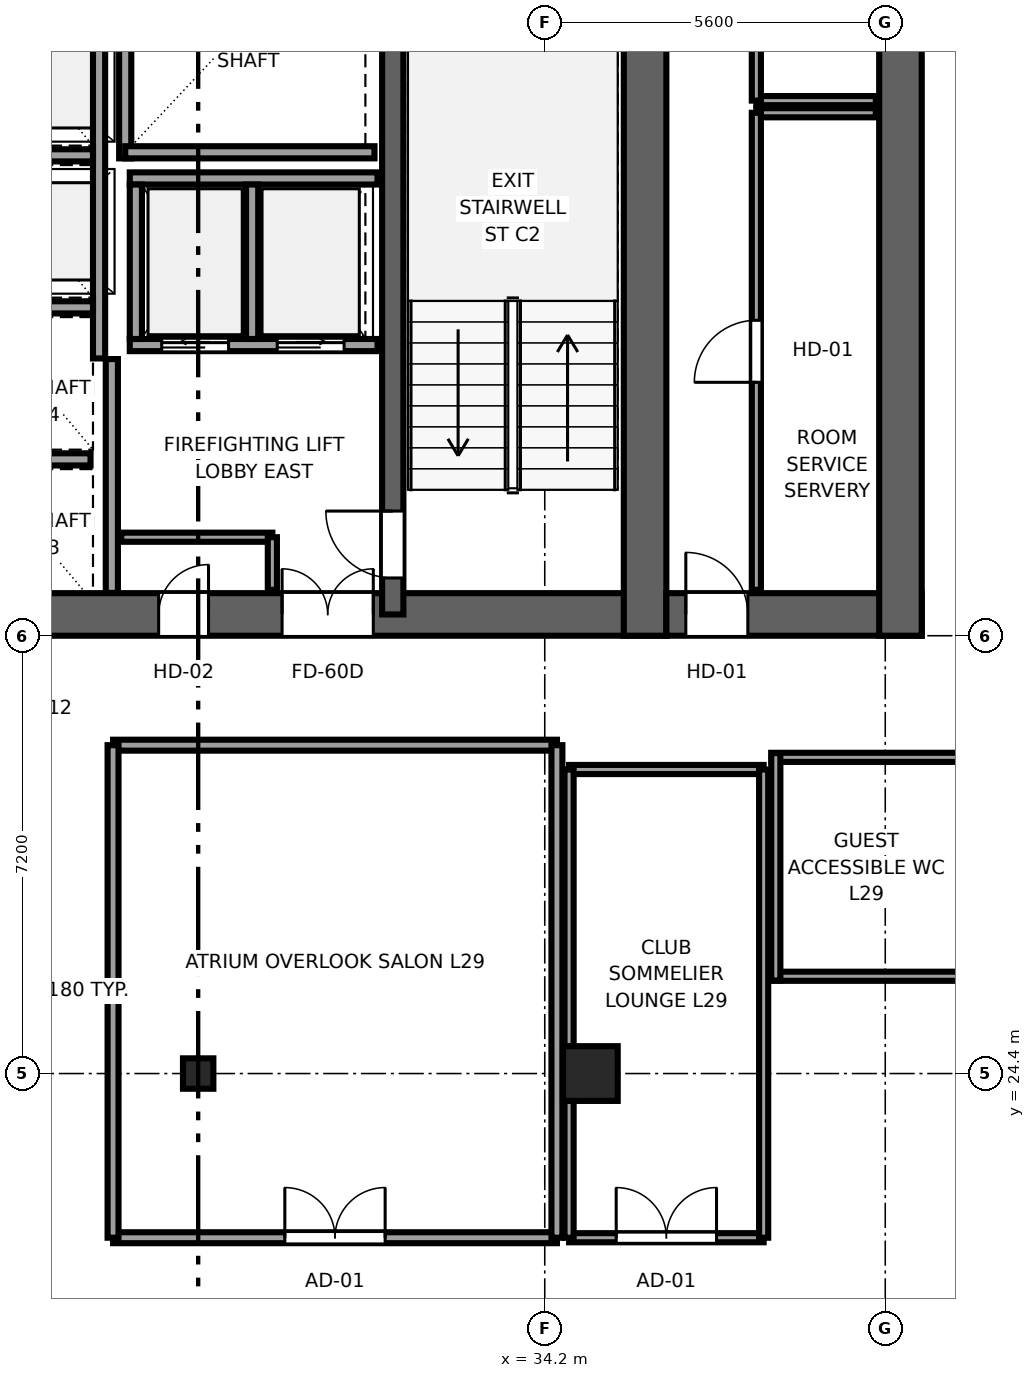
"""IFC4 building model, lengths in metres.
Left out: names, types, materials, properties, quantities, classifications, styles, units other than length and angle.
Written with IfcOpenShell. Run it as: python <this file> out.ifc"""

import sys

from ifc_helpers import new_model, si_unit, direction, frame, frame_2d, origin, origin_2d, place, context, subcontext, project, spatial, rectangle, i_section, extrude, source, transform, mapped, element, fill, save


model = new_model("IFC4")
c1 = context("Model", 3, precision=1e-05, world=origin(), true_north=direction((0.0, 1.0)))
c2 = subcontext(c1, "Body", "Model", "MODEL_VIEW")
j1 = project(units=[si_unit("LENGTHUNIT", "METRE"), si_unit("PLANEANGLEUNIT", "RADIAN")], contexts=[c1])
p1 = place(None, origin())
s1 = spatial("IfcSite", under=j1, at=p1, CompositionType="ELEMENT")
p2 = place(p1, origin())
s2 = spatial("IfcBuilding", under=s1, at=p2, CompositionType="ELEMENT")
p3 = place(p2, frame((0.0, 0.0, 115.1)))
s3 = spatial("IfcBuildingStorey", under=s2, at=p3, CompositionType="ELEMENT", Elevation=115.1)
p4 = place(p3, frame((9.8, 31.95, 0.0), z_axis=(0.0, 0.0, 1.0), x_axis=(1.0, 0.0, 0.0)))
e1 = element("IfcWall", 1, at=p4, inside=s3, PredefinedType="SHEAR", context=c2, shape_type="SweptSolid", body=[
    extrude(rectangle(XDim=26.4, YDim=0.7, at=frame_2d((13.2, 0.0))), origin(), (0.0, 0.0, 1.0), 3.55),
])
p5 = place(p4, frame((6.32, 0.0, 0.0), z_axis=(0.0, 0.0, 1.0), x_axis=(-1.0, 0.0, 0.0)))
e2 = element("IfcOpeningElement", 2, at=p5, cuts=e1, PredefinedType="OPENING", context=c2, shape_type="SweptSolid", body=[
    extrude(rectangle(XDim=1.5, YDim=2.04, at=frame_2d((0.75, 1.02))), frame((0.0, 0.36, 0.0), z_axis=(0.0, -1.0, 0.0), x_axis=(1.0, 0.0, 0.0)), (0.0, 0.0, 1.0), 0.72),
])
p6 = place(p4, frame((13.95, 0.0, 0.0), z_axis=(0.0, 0.0, 1.0), x_axis=(-1.0, 0.0, 0.0)))
e3 = element("IfcOpeningElement", 3, at=p6, cuts=e1, PredefinedType="OPENING", context=c2, shape_type="SweptSolid", body=[
    extrude(rectangle(XDim=1.5, YDim=2.04, at=frame_2d((0.75, 1.02))), frame((0.0, 0.36, 0.0), z_axis=(0.0, -1.0, 0.0), x_axis=(1.0, 0.0, 0.0)), (0.0, 0.0, 1.0), 0.72),
])
p7 = place(p4, frame((21.58, 0.0, 0.0), z_axis=(0.0, 0.0, 1.0), x_axis=(-1.0, 0.0, 0.0)))
e4 = element("IfcOpeningElement", 4, at=p7, cuts=e1, PredefinedType="OPENING", context=c2, shape_type="SweptSolid", body=[
    extrude(rectangle(XDim=1.5, YDim=2.04, at=frame_2d((0.75, 1.02))), frame((0.0, 0.36, 0.0), z_axis=(0.0, -1.0, 0.0), x_axis=(1.0, 0.0, 0.0)), (0.0, 0.0, 1.0), 0.72),
])
p8 = place(p4, frame((8.37, 0.0, 0.0), z_axis=(0.0, 0.0, 1.0), x_axis=(-1.0, 0.0, 0.0)))
e5 = element("IfcOpeningElement", 5, at=p8, cuts=e1, PredefinedType="OPENING", context=c2, shape_type="SweptSolid", body=[
    extrude(rectangle(XDim=0.82, YDim=2.01, at=frame_2d((0.41, 1.005))), frame((0.0, 0.36, 0.0), z_axis=(0.0, -1.0, 0.0), x_axis=(1.0, 0.0, 0.0)), (0.0, 0.0, 1.0), 0.72),
])
p9 = place(p4, frame((18.87, 0.0, 0.0), z_axis=(0.0, 0.0, 1.0), x_axis=(-1.0, 0.0, 0.0)))
e6 = element("IfcOpeningElement", 6, at=p9, cuts=e1, PredefinedType="OPENING", context=c2, shape_type="SweptSolid", body=[
    extrude(rectangle(XDim=0.82, YDim=2.01, at=frame_2d((0.41, 1.005))), frame((0.0, 0.36, 0.0), z_axis=(0.0, -1.0, 0.0), x_axis=(1.0, 0.0, 0.0)), (0.0, 0.0, 1.0), 0.72),
])
p10 = place(p3, frame((35.85, 31.6, 0.0), z_axis=(0.0, 0.0, 1.0), x_axis=(0.0, 1.0, 0.0)))
e7 = element("IfcWall", 7, at=p10, inside=s3, PredefinedType="SHEAR", context=c2, shape_type="SweptSolid", body=[
    extrude(rectangle(XDim=13.6, YDim=0.7, at=frame_2d((6.8, 0.0))), origin(), (0.0, 0.0, 1.0), 3.55),
])
p11 = place(p3, frame((31.7, 31.95, 0.0), z_axis=(0.0, 0.0, 1.0), x_axis=(0.0, 1.0, 0.0)))
e8 = element("IfcWall", 8, at=p11, inside=s3, PredefinedType="SHEAR", context=c2, shape_type="SweptSolid", body=[
    extrude(rectangle(XDim=12.9, YDim=0.35, at=frame_2d((6.45, 0.0))), origin(), (0.0, 0.0, 1.0), 3.55),
])
p12 = place(p11, frame((1.7, 0.0, 0.0), z_axis=(0.0, 0.0, 1.0), x_axis=(-1.0, 0.0, 0.0)))
e9 = element("IfcOpeningElement", 9, at=p12, cuts=e8, PredefinedType="OPENING", context=c2, shape_type="SweptSolid", body=[
    extrude(rectangle(XDim=1.1, YDim=2.12, at=frame_2d((0.55, 1.06))), frame((0.0, 0.185, 0.0), z_axis=(0.0, -1.0, 0.0), x_axis=(1.0, 0.0, 0.0)), (0.0, 0.0, 1.0), 0.37),
])
p13 = place(p3, frame((36.2, 31.95, 0.0), z_axis=(0.0, 0.0, 1.0), x_axis=(1.0, 0.0, 0.0)))
e10 = element("IfcWall", 10, at=p13, inside=s3, PredefinedType="SHEAR", context=c2, shape_type="SweptSolid", body=[
    extrude(rectangle(XDim=4.2, YDim=0.7, at=frame_2d((2.1, 0.0))), origin(), (0.0, 0.0, 1.0), 3.55),
])
p14 = place(p13, frame((1.34, 0.0, 0.0), z_axis=(0.0, 0.0, 1.0), x_axis=(-1.0, 0.0, 0.0)))
e11 = element("IfcOpeningElement", 11, at=p14, cuts=e10, PredefinedType="OPENING", context=c2, shape_type="SweptSolid", body=[
    extrude(rectangle(XDim=1.02, YDim=2.03, at=frame_2d((0.51, 1.015))), frame((0.0, 0.36, 0.0), z_axis=(0.0, -1.0, 0.0), x_axis=(1.0, 0.0, 0.0)), (0.0, 0.0, 1.0), 0.72),
])
p15 = place(p3, frame((40.05, 31.6, 0.0), z_axis=(0.0, 0.0, 1.0), x_axis=(0.0, 1.0, 0.0)))
e12 = element("IfcWall", 12, at=p15, inside=s3, PredefinedType="SHEAR", context=c2, shape_type="SweptSolid", body=[
    extrude(rectangle(XDim=13.6, YDim=0.7, at=frame_2d((6.8, 0.0))), origin(), (0.0, 0.0, 1.0), 3.55),
])
m1 = source(origin(), c2, "Body", "SweptSolid", [
    extrude(rectangle(XDim=0.9, YDim=0.9, at=origin_2d()), origin(), (0.0, 0.0, 1.0), 3.55),
])
p16 = place(p3, frame((34.95, 24.4, 0.0), z_axis=(0.0, 0.0, 1.0), x_axis=(1.0, 0.0, 0.0)))
e13 = element("IfcColumn", 13, at=p16, inside=s3, PredefinedType="COLUMN", context=c2, shape_type="MappedRepresentation", body=[
    mapped(m1, transform((0.0, 0.0, 0.0), x_axis=(1.0, 0.0, 0.0), y_axis=(0.0, 1.0, 0.0), z_axis=(0.0, 0.0, 1.0), scale=1.0)),
])
m2 = source(origin(), c2, "Body", "SweptSolid", [
    extrude(i_section(OverallWidth=0.5, OverallDepth=0.5, WebThickness=0.022, FlangeThickness=0.034, at=origin_2d()), origin(), (0.0, 0.0, 1.0), 3.55),
])
p17 = place(p3, frame((28.5, 24.4, 0.0), z_axis=(0.0, 0.0, 1.0), x_axis=(1.0, 0.0, 0.0)))
e14 = element("IfcColumn", 14, at=p17, inside=s3, PredefinedType="COLUMN", context=c2, shape_type="MappedRepresentation", body=[
    mapped(m2, transform((0.0, 0.0, 0.0), x_axis=(1.0, 0.0, 0.0), y_axis=(0.0, 1.0, 0.0), z_axis=(0.0, 0.0, 1.0), scale=1.0)),
])
p18 = place(p3, frame((27.3, 39.45, 0.0), z_axis=(0.0, 0.0, 1.0), x_axis=(0.0, 1.0, 0.0)))
e15 = element("IfcWall", 15, at=p18, inside=s3, PredefinedType="SOLIDWALL", context=c2, shape_type="SweptSolid", body=[
    extrude(rectangle(XDim=4.4, YDim=0.2, at=frame_2d((2.2, 0.0))), origin(), (0.0, 0.0, 1.0), 3.37),
])
p19 = place(p3, frame((27.3, 39.55, 0.0), z_axis=(0.0, 0.0, 1.0), x_axis=(1.0, 0.0, 0.0)))
e16 = element("IfcWall", 16, at=p19, inside=s3, PredefinedType="SOLIDWALL", context=c2, shape_type="SweptSolid", body=[
    extrude(rectangle(XDim=4.1, YDim=0.2, at=frame_2d((2.05, 0.0))), origin(), (0.0, 0.0, 1.0), 3.37),
])
p20 = place(p3, frame((27.08, 32.304, 0.0), z_axis=(0.0, 0.0, 1.0), x_axis=(0.0, 1.0, 0.0)))
e17 = element("IfcWall", 17, at=p20, inside=s3, PredefinedType="SOLIDWALL", context=c2, shape_type="SweptSolid", body=[
    extrude(rectangle(XDim=3.846, YDim=0.2, at=frame_2d((1.923, 0.0))), origin(), (0.0, 0.0, 1.0), 3.37),
])
p21 = place(p3, frame((27.375, 36.38, 0.0), z_axis=(0.0, 0.0, 1.0), x_axis=(1.0, 0.0, 0.0)))
e18 = element("IfcWall", 18, at=p21, inside=s3, PredefinedType="SOLIDWALL", context=c2, shape_type="SweptSolid", body=[
    extrude(rectangle(XDim=4.075, YDim=0.2, at=frame_2d((2.038, 0.0))), origin(), (0.0, 0.0, 1.0), 3.37),
])
p22 = place(p21, frame((0.525, 0.0, 0.0)))
e19 = element("IfcOpeningElement", 19, at=p22, cuts=e18, PredefinedType="OPENING", context=c2, shape_type="SweptSolid", body=[
    extrude(rectangle(XDim=1.1, YDim=2.12, at=frame_2d((0.55, 1.06))), frame((0.0, 0.11, 0.0), z_axis=(0.0, -1.0, 0.0), x_axis=(1.0, 0.0, 0.0)), (0.0, 0.0, 1.0), 0.22),
])
p23 = place(p21, frame((2.425, 0.0, 0.0)))
e20 = element("IfcOpeningElement", 20, at=p23, cuts=e18, PredefinedType="OPENING", context=c2, shape_type="SweptSolid", body=[
    extrude(rectangle(XDim=1.1, YDim=2.12, at=frame_2d((0.55, 1.06))), frame((0.0, 0.11, 0.0), z_axis=(0.0, -1.0, 0.0), x_axis=(1.0, 0.0, 0.0)), (0.0, 0.0, 1.0), 0.22),
])
p24 = place(p3, frame((27.375, 39.12, 0.0), z_axis=(0.0, 0.0, 1.0), x_axis=(1.0, 0.0, 0.0)))
e21 = element("IfcWall", 21, at=p24, inside=s3, PredefinedType="SOLIDWALL", context=c2, shape_type="SweptSolid", body=[
    extrude(rectangle(XDim=4.075, YDim=0.2, at=frame_2d((2.038, 0.0))), origin(), (0.0, 0.0, 1.0), 3.37),
])
for number, where, z_axis, x_axis in (
    (22, (27.475, 36.48, 0.0), (0.0, 0.0, 1.0), (0.0, 1.0, 0.0)),
    (23, (29.387, 36.48, 0.0), (0.0, 0.0, 1.0), (0.0, 1.0, 0.0)),
):
    element("IfcWall", number, at=place(p3, frame(where, z_axis=z_axis, x_axis=x_axis)), inside=s3, PredefinedType="SOLIDWALL", context=c2, shape_type="SweptSolid", body=[
        extrude(rectangle(XDim=2.54, YDim=0.2, at=frame_2d((1.27, 0.0))), origin(), (0.0, 0.0, 1.0), 3.37),
    ])
p25 = place(p3, frame((26.87, 36.16, 0.0), z_axis=(0.0, 0.0, 1.0), x_axis=(0.0, 1.0, 0.0)))
e24 = element("IfcWall", 24, at=p25, inside=s3, PredefinedType="SOLIDWALL", context=c2, shape_type="SweptSolid", body=[
    extrude(rectangle(XDim=8.336, YDim=0.2, at=frame_2d((4.168, 0.0))), origin(), (0.0, 0.0, 1.0), 3.37),
])
p26 = place(p3, frame((24.93, 34.5, 0.0), z_axis=(0.0, 0.0, 1.0), x_axis=(1.0, 0.0, 0.0)))
e25 = element("IfcWall", 25, at=p26, inside=s3, PredefinedType="SOLIDWALL", context=c2, shape_type="SweptSolid", body=[
    extrude(rectangle(XDim=1.8, YDim=0.2, at=frame_2d((0.9, 0.0))), origin(), (0.0, 0.0, 1.0), 3.37),
])
for number, where, z_axis, x_axis in (
    (26, (24.93, 37.0, 0.0), (0.0, 0.0, 1.0), (1.0, 0.0, 0.0)),
    (27, (24.93, 39.5, 0.0), (0.0, 0.0, 1.0), (1.0, 0.0, 0.0)),
):
    element("IfcWall", number, at=place(p3, frame(where, z_axis=z_axis, x_axis=x_axis)), inside=s3, PredefinedType="SOLIDWALL", context=c2, shape_type="SweptSolid", body=[
        extrude(rectangle(XDim=1.84, YDim=0.2, at=frame_2d((0.92, 0.0))), origin(), (0.0, 0.0, 1.0), 3.37),
    ])
p27 = place(p3, frame((27.235, 33.22, 0.0), z_axis=(0.0, 0.0, 1.0), x_axis=(1.0, 0.0, 0.0)))
e28 = element("IfcWall", 28, at=p27, inside=s3, PredefinedType="PARTITIONING", context=c2, shape_type="SweptSolid", body=[
    extrude(rectangle(XDim=2.485, YDim=0.15, at=frame_2d((1.242, 0.0))), origin(), (0.0, 0.0, 1.0), 3.37),
])
p28 = place(p3, frame((29.72, 32.355, 0.0), z_axis=(0.0, 0.0, 1.0), x_axis=(0.0, 1.0, 0.0)))
e29 = element("IfcWall", 29, at=p28, inside=s3, PredefinedType="PARTITIONING", context=c2, shape_type="SweptSolid", body=[
    extrude(rectangle(XDim=0.865, YDim=0.15, at=frame_2d((0.433, 0.0))), origin(), (0.0, 0.0, 1.0), 3.37),
])
p29 = place(p3, frame((37.68, 40.2, 0.0), z_axis=(0.0, 0.0, 1.0), x_axis=(1.0, 0.0, 0.0)))
e30 = element("IfcWall", 30, at=p29, inside=s3, PredefinedType="PARTITIONING", context=c2, shape_type="SweptSolid", body=[
    extrude(rectangle(XDim=1.965, YDim=0.15, at=frame_2d((0.982, 0.0))), origin(), (0.0, 0.0, 1.0), 3.37),
])
p30 = place(p3, frame((37.68, 32.355, 0.0), z_axis=(0.0, 0.0, 1.0), x_axis=(0.0, 1.0, 0.0)))
e31 = element("IfcWall", 31, at=p30, inside=s3, PredefinedType="PARTITIONING", context=c2, shape_type="SweptSolid", body=[
    extrude(rectangle(XDim=7.845, YDim=0.15, at=frame_2d((3.922, 0.0))), origin(), (0.0, 0.0, 1.0), 3.37),
])
p31 = place(p30, frame((3.413, 0.0, 0.0)))
e32 = element("IfcOpeningElement", 32, at=p31, cuts=e31, PredefinedType="OPENING", context=c2, shape_type="SweptSolid", body=[
    extrude(rectangle(XDim=1.02, YDim=2.03, at=frame_2d((0.51, 1.015))), frame((0.0, 0.085, 0.0), z_axis=(0.0, -1.0, 0.0), x_axis=(1.0, 0.0, 0.0)), (0.0, 0.0, 1.0), 0.17),
])
p32 = place(p3, frame((37.68, 40.4, 0.0), z_axis=(0.0, 0.0, 1.0), x_axis=(1.0, 0.0, 0.0)))
e33 = element("IfcWall", 33, at=p32, inside=s3, PredefinedType="PARTITIONING", context=c2, shape_type="SweptSolid", body=[
    extrude(rectangle(XDim=1.965, YDim=0.15, at=frame_2d((0.982, 0.0))), origin(), (0.0, 0.0, 1.0), 3.37),
])
p33 = place(p3, frame((37.68, 40.4, 0.0), z_axis=(0.0, 0.0, 1.0), x_axis=(0.0, 1.0, 0.0)))
e34 = element("IfcWall", 34, at=p33, inside=s3, PredefinedType="PARTITIONING", context=c2, shape_type="SweptSolid", body=[
    extrude(rectangle(XDim=3.2, YDim=0.15, at=frame_2d((1.6, 0.0))), origin(), (0.0, 0.0, 1.0), 3.37),
])
p34 = place(p33, frame((1.19, 0.0, 0.0)))
e35 = element("IfcOpeningElement", 35, at=p34, cuts=e34, PredefinedType="OPENING", context=c2, shape_type="SweptSolid", body=[
    extrude(rectangle(XDim=0.82, YDim=2.01, at=frame_2d((0.41, 1.005))), frame((0.0, 0.085, 0.0), z_axis=(0.0, -1.0, 0.0), x_axis=(1.0, 0.0, 0.0)), (0.0, 0.0, 1.0), 0.17),
])
for number, where, z_axis, x_axis in (
    (36, (37.93, 26.0, 0.0), (0.0, 0.0, 1.0), (1.0, 0.0, 0.0)),
    (37, (37.93, 29.6, 0.0), (0.0, 0.0, 1.0), (1.0, 0.0, 0.0)),
):
    element("IfcWall", number, at=place(p3, frame(where, z_axis=z_axis, x_axis=x_axis)), inside=s3, PredefinedType="PARTITIONING", context=c2, shape_type="SweptSolid", body=[
        extrude(rectangle(XDim=4.4, YDim=0.15, at=frame_2d((2.2, 0.0))), origin(), (0.0, 0.0, 1.0), 3.37),
    ])
p35 = place(p3, frame((38.0, 25.93, 0.0), z_axis=(0.0, 0.0, 1.0), x_axis=(0.0, 1.0, 0.0)))
e38 = element("IfcWall", 38, at=p35, inside=s3, PredefinedType="PARTITIONING", context=c2, shape_type="SweptSolid", body=[
    extrude(rectangle(XDim=3.74, YDim=0.15, at=frame_2d((1.87, 0.0))), origin(), (0.0, 0.0, 1.0), 3.37),
])
p36 = place(p3, frame((27.1, 21.7, 0.0), z_axis=(0.0, 0.0, 1.0), x_axis=(1.0, 0.0, 0.0)))
e39 = element("IfcWall", 39, at=p36, inside=s3, PredefinedType="PARTITIONING", context=c2, shape_type="SweptSolid", body=[
    extrude(rectangle(XDim=7.3, YDim=0.18, at=frame_2d((3.65, 0.0))), origin(), (0.0, 0.0, 1.0), 3.37),
])
p37 = place(p36, frame((2.825, 0.0, 0.0)))
e40 = element("IfcOpeningElement", 40, at=p37, cuts=e39, PredefinedType="OPENING", context=c2, shape_type="SweptSolid", body=[
    extrude(rectangle(XDim=1.65, YDim=2.15, at=frame_2d((0.825, 1.075))), frame((0.0, 0.1, 0.0), z_axis=(0.0, -1.0, 0.0), x_axis=(1.0, 0.0, 0.0)), (0.0, 0.0, 1.0), 0.2),
])
p38 = place(p3, frame((27.1, 29.8, 0.0), z_axis=(0.0, 0.0, 1.0), x_axis=(1.0, 0.0, 0.0)))
e41 = element("IfcWall", 41, at=p38, inside=s3, PredefinedType="PARTITIONING", context=c2, shape_type="SweptSolid", body=[
    extrude(rectangle(XDim=7.3, YDim=0.18, at=frame_2d((3.65, 0.0))), origin(), (0.0, 0.0, 1.0), 3.37),
])
for number, where, z_axis, x_axis in (
    (42, (27.1, 21.7, 0.0), (0.0, 0.0, 1.0), (0.0, 1.0, 0.0)),
    (43, (34.4, 21.7, 0.0), (0.0, 0.0, 1.0), (0.0, 1.0, 0.0)),
):
    element("IfcWall", number, at=place(p3, frame(where, z_axis=z_axis, x_axis=x_axis)), inside=s3, PredefinedType="PARTITIONING", context=c2, shape_type="SweptSolid", body=[
        extrude(rectangle(XDim=8.1, YDim=0.18, at=frame_2d((4.05, 0.0))), origin(), (0.0, 0.0, 1.0), 3.37),
    ])
p39 = place(p3, frame((34.6, 21.7, 0.0), z_axis=(0.0, 0.0, 1.0), x_axis=(1.0, 0.0, 0.0)))
e44 = element("IfcWall", 44, at=p39, inside=s3, PredefinedType="PARTITIONING", context=c2, shape_type="SweptSolid", body=[
    extrude(rectangle(XDim=3.2, YDim=0.15, at=frame_2d((1.6, 0.0))), origin(), (0.0, 0.0, 1.0), 3.37),
])
p40 = place(p39, frame((0.775, 0.0, 0.0)))
e45 = element("IfcOpeningElement", 45, at=p40, cuts=e44, PredefinedType="OPENING", context=c2, shape_type="SweptSolid", body=[
    extrude(rectangle(XDim=1.65, YDim=2.15, at=frame_2d((0.825, 1.075))), frame((0.0, 0.085, 0.0), z_axis=(0.0, -1.0, 0.0), x_axis=(1.0, 0.0, 0.0)), (0.0, 0.0, 1.0), 0.17),
])
p41 = place(p3, frame((34.6, 29.4, 0.0), z_axis=(0.0, 0.0, 1.0), x_axis=(1.0, 0.0, 0.0)))
e46 = element("IfcWall", 46, at=p41, inside=s3, PredefinedType="PARTITIONING", context=c2, shape_type="SweptSolid", body=[
    extrude(rectangle(XDim=3.2, YDim=0.15, at=frame_2d((1.6, 0.0))), origin(), (0.0, 0.0, 1.0), 3.37),
])
for number, where, z_axis, x_axis in (
    (47, (34.6, 21.7, 0.0), (0.0, 0.0, 1.0), (0.0, 1.0, 0.0)),
    (48, (37.8, 21.7, 0.0), (0.0, 0.0, 1.0), (0.0, 1.0, 0.0)),
):
    element("IfcWall", number, at=place(p3, frame(where, z_axis=z_axis, x_axis=x_axis)), inside=s3, PredefinedType="PARTITIONING", context=c2, shape_type="SweptSolid", body=[
        extrude(rectangle(XDim=7.7, YDim=0.15, at=frame_2d((3.85, 0.0))), origin(), (0.0, 0.0, 1.0), 3.37),
    ])
m3 = source(origin(), c2, "Body", "SweptSolid", [
    extrude(rectangle(XDim=1.1, YDim=2.12, at=frame_2d((0.55, 1.06))), frame((0.0, 0.025, 0.0), z_axis=(0.0, -1.0, 0.0), x_axis=(1.0, 0.0, 0.0)), (0.0, 0.0, 1.0), 0.05),
])
p42 = place(p12, origin())
e49 = element("IfcDoor", 49, at=p42, inside=s3, OperationType="SINGLE_SWING_RIGHT", PredefinedType="DOOR", context=c2, shape_type="MappedRepresentation", body=[
    mapped(m3, transform((0.0, 0.0, 0.0), x_axis=(1.0, 0.0, 0.0), y_axis=(0.0, 1.0, 0.0), z_axis=(0.0, 0.0, 1.0), scale=1.0)),
])
fill(e9, e49)
m4 = source(origin(), c2, "Body", "SweptSolid", [
    extrude(rectangle(XDim=1.5, YDim=2.04, at=frame_2d((0.75, 1.02))), frame((0.0, 0.025, 0.0), z_axis=(0.0, -1.0, 0.0), x_axis=(1.0, 0.0, 0.0)), (0.0, 0.0, 1.0), 0.05),
])
p43 = place(p7, origin())
e50 = element("IfcDoor", 50, at=p43, inside=s3, OperationType="DOUBLE_DOOR_SINGLE_SWING", PredefinedType="DOOR", context=c2, shape_type="MappedRepresentation", body=[
    mapped(m4, transform((0.0, 0.0, 0.0), x_axis=(1.0, 0.0, 0.0), y_axis=(0.0, 1.0, 0.0), z_axis=(0.0, 0.0, 1.0), scale=1.0)),
])
fill(e4, e50)
m5 = source(origin(), c2, "Body", "SweptSolid", [
    extrude(rectangle(XDim=0.82, YDim=2.01, at=frame_2d((0.41, 1.005))), frame((0.0, 0.025, 0.0), z_axis=(0.0, -1.0, 0.0), x_axis=(1.0, 0.0, 0.0)), (0.0, 0.0, 1.0), 0.05),
])
p44 = place(p9, origin())
e51 = element("IfcDoor", 51, at=p44, inside=s3, OperationType="SINGLE_SWING_RIGHT", PredefinedType="DOOR", context=c2, shape_type="MappedRepresentation", body=[
    mapped(m5, transform((0.0, 0.0, 0.0), x_axis=(1.0, 0.0, 0.0), y_axis=(0.0, 1.0, 0.0), z_axis=(0.0, 0.0, 1.0), scale=1.0)),
])
fill(e6, e51)
m6 = source(origin(), c2, "Body", "SweptSolid", [
    extrude(rectangle(XDim=1.02, YDim=2.03, at=frame_2d((0.51, 1.015))), frame((0.0, 0.025, 0.0), z_axis=(0.0, -1.0, 0.0), x_axis=(1.0, 0.0, 0.0)), (0.0, 0.0, 1.0), 0.05),
])
p45 = place(p14, origin())
e52 = element("IfcDoor", 52, at=p45, inside=s3, OperationType="SINGLE_SWING_LEFT", PredefinedType="DOOR", context=c2, shape_type="MappedRepresentation", body=[
    mapped(m6, transform((0.0, 0.0, 0.0), x_axis=(1.0, 0.0, 0.0), y_axis=(0.0, 1.0, 0.0), z_axis=(0.0, 0.0, 1.0), scale=1.0)),
])
fill(e11, e52)
m7 = source(origin(), c2, "Body", "SweptSolid", [
    extrude(rectangle(XDim=1.1, YDim=2.12, at=frame_2d((0.55, 1.06))), frame((0.0, 0.025, 0.0), z_axis=(0.0, -1.0, 0.0), x_axis=(1.0, 0.0, 0.0)), (0.0, 0.0, 1.0), 0.05),
])
p46 = place(p22, origin())
e53 = element("IfcDoor", 53, at=p46, inside=s3, OperationType="SLIDING_TO_LEFT", PredefinedType="DOOR", context=c2, shape_type="MappedRepresentation", body=[
    mapped(m7, transform((0.0, 0.0, 0.0), x_axis=(1.0, 0.0, 0.0), y_axis=(0.0, 1.0, 0.0), z_axis=(0.0, 0.0, 1.0), scale=1.0)),
])
fill(e19, e53)
p47 = place(p23, origin())
e54 = element("IfcDoor", 54, at=p47, inside=s3, OperationType="SLIDING_TO_RIGHT", PredefinedType="DOOR", context=c2, shape_type="MappedRepresentation", body=[
    mapped(m7, transform((0.0, 0.0, 0.0), x_axis=(1.0, 0.0, 0.0), y_axis=(0.0, 1.0, 0.0), z_axis=(0.0, 0.0, 1.0), scale=1.0)),
])
fill(e20, e54)
p48 = place(p31, origin())
e55 = element("IfcDoor", 55, at=p48, inside=s3, OperationType="SINGLE_SWING_LEFT", PredefinedType="DOOR", context=c2, shape_type="MappedRepresentation", body=[
    mapped(m6, transform((0.0, 0.0, 0.0), x_axis=(1.0, 0.0, 0.0), y_axis=(0.0, 1.0, 0.0), z_axis=(0.0, 0.0, 1.0), scale=1.0)),
])
fill(e32, e55)
m8 = source(origin(), c2, "Body", "SweptSolid", [
    extrude(rectangle(XDim=1.65, YDim=2.15, at=frame_2d((0.825, 1.075))), frame((0.0, 0.025, 0.0), z_axis=(0.0, -1.0, 0.0), x_axis=(1.0, 0.0, 0.0)), (0.0, 0.0, 1.0), 0.05),
])
p49 = place(p37, origin())
e56 = element("IfcDoor", 56, at=p49, inside=s3, OperationType="DOUBLE_DOOR_SINGLE_SWING", PredefinedType="DOOR", context=c2, shape_type="MappedRepresentation", body=[
    mapped(m8, transform((0.0, 0.0, 0.0), x_axis=(1.0, 0.0, 0.0), y_axis=(0.0, 1.0, 0.0), z_axis=(0.0, 0.0, 1.0), scale=1.0)),
])
fill(e40, e56)
p50 = place(p40, origin())
e57 = element("IfcDoor", 57, at=p50, inside=s3, OperationType="DOUBLE_DOOR_SINGLE_SWING", PredefinedType="DOOR", context=c2, shape_type="MappedRepresentation", body=[
    mapped(m8, transform((0.0, 0.0, 0.0), x_axis=(1.0, 0.0, 0.0), y_axis=(0.0, 1.0, 0.0), z_axis=(0.0, 0.0, 1.0), scale=1.0)),
])
fill(e45, e57)
save(model, sys.argv[1])
